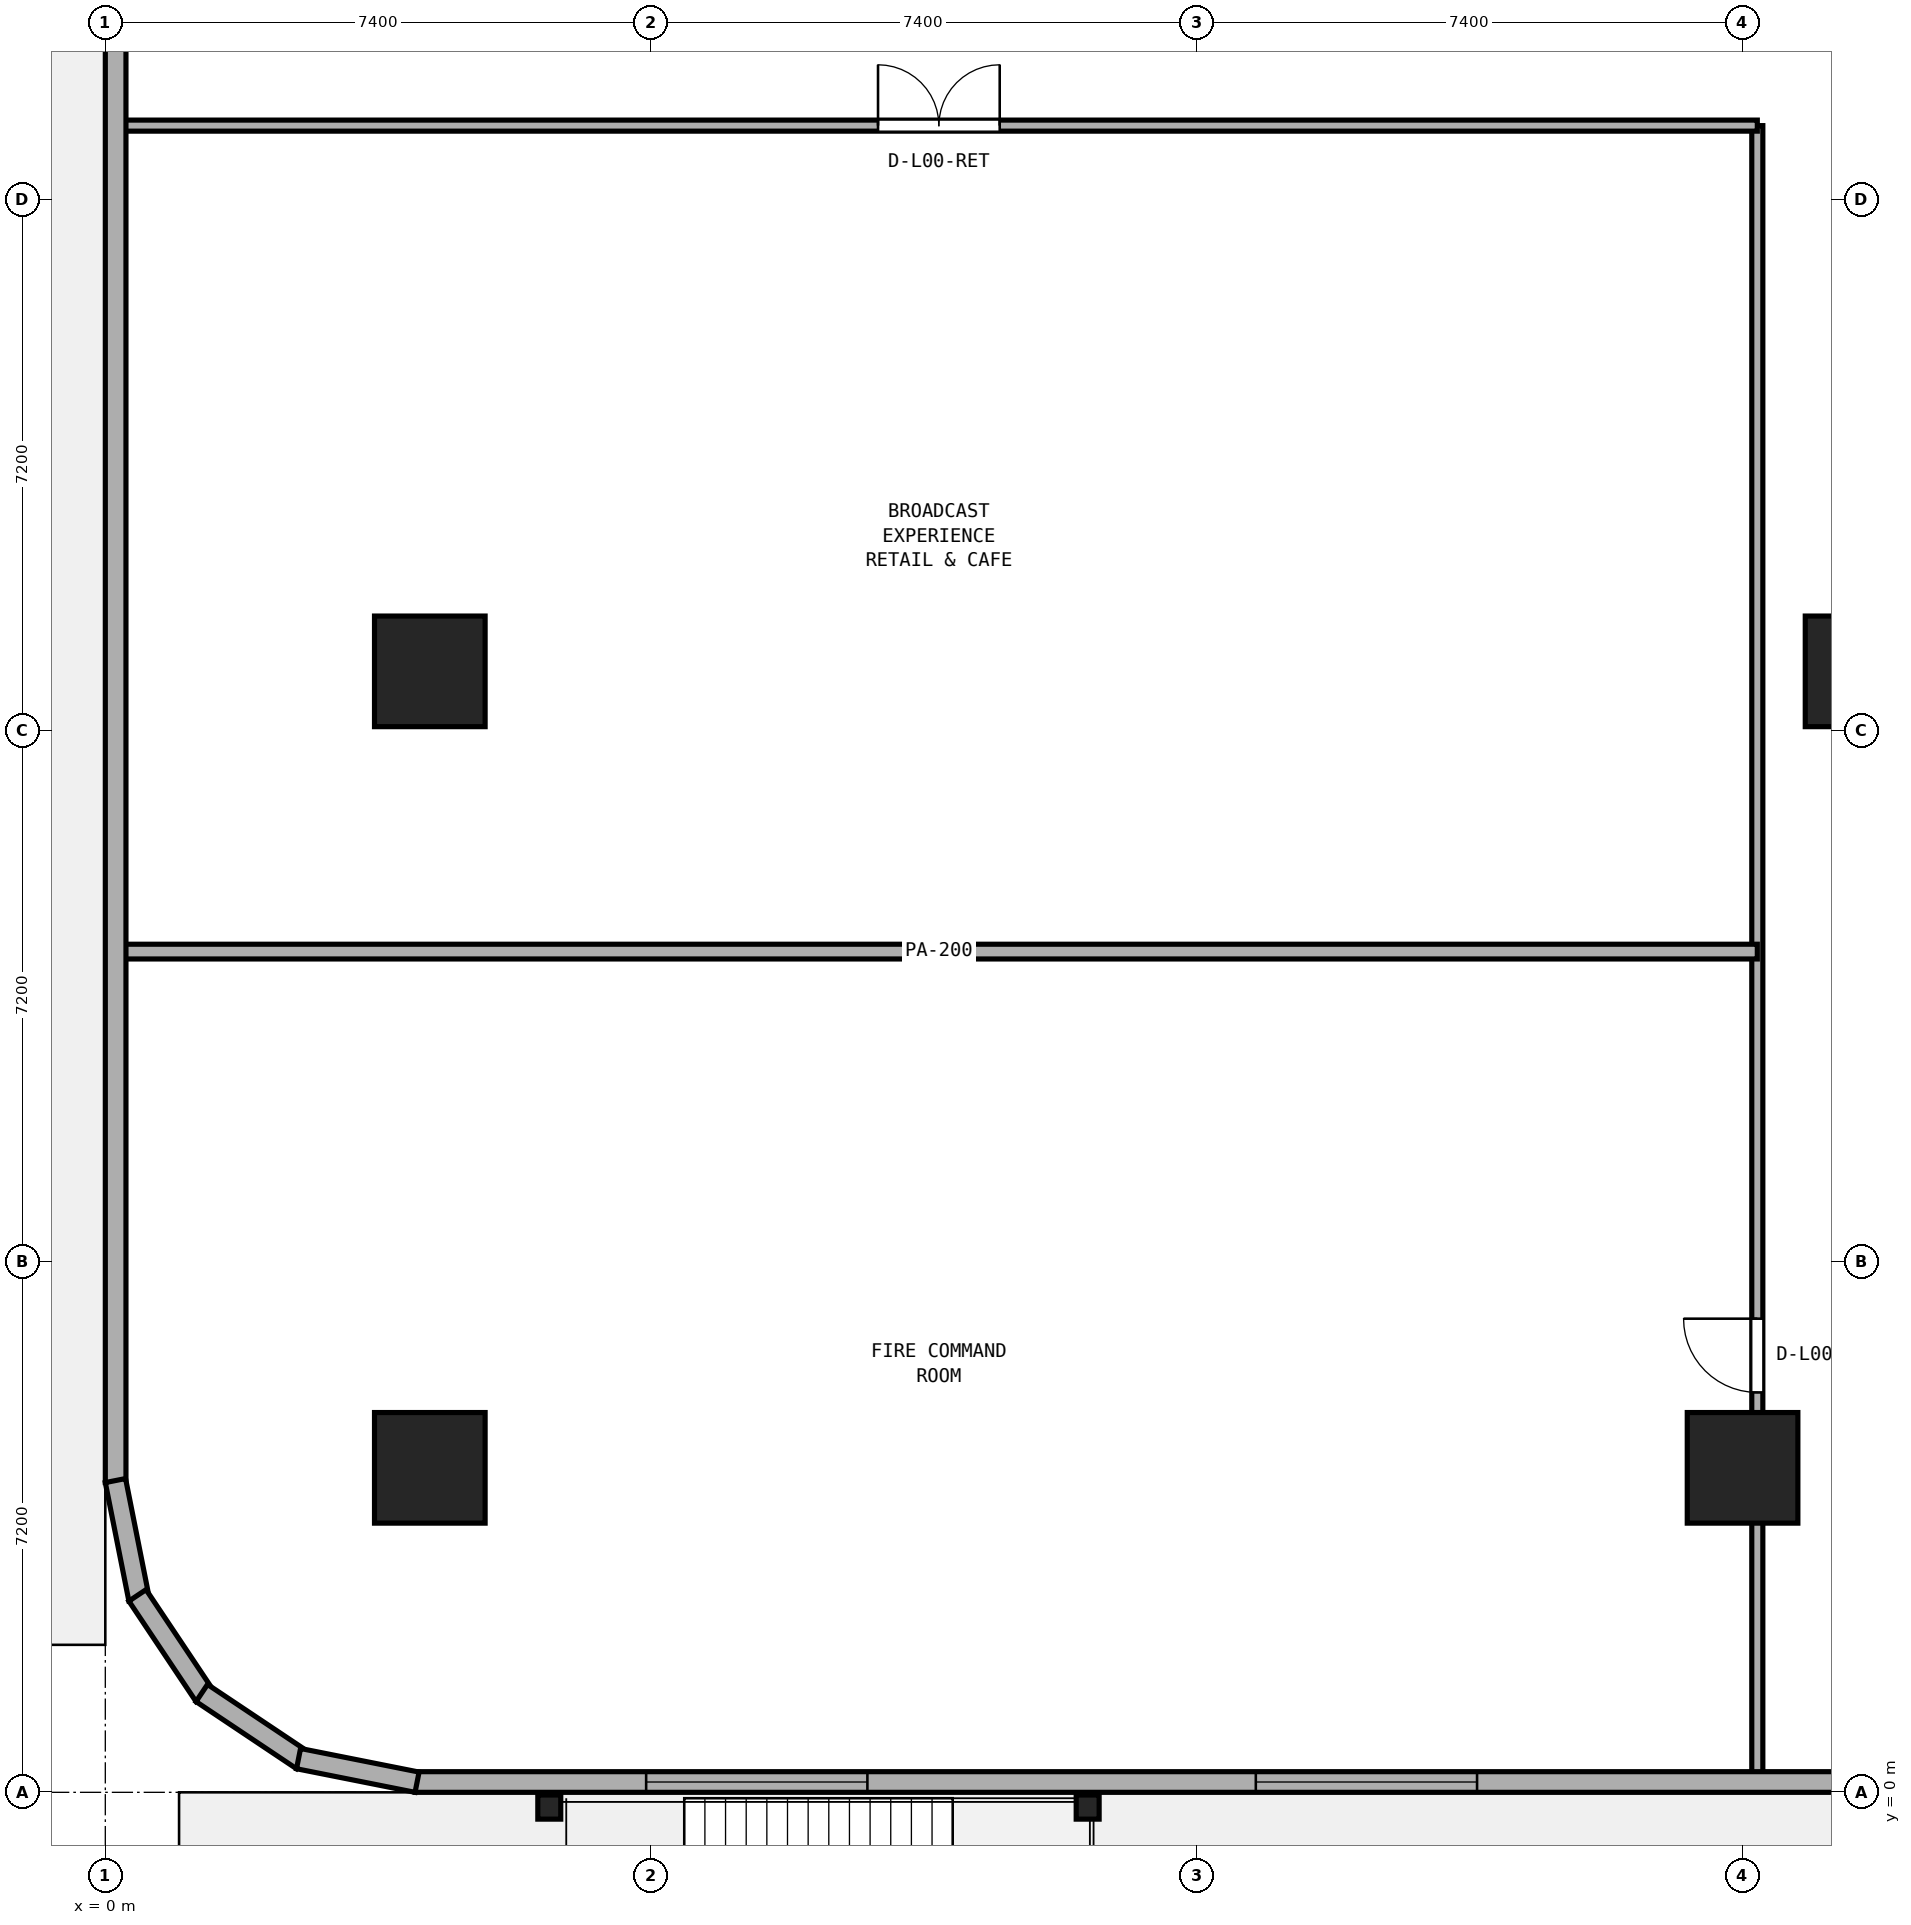
"""IFC4 building model, lengths in metres.
Left out: names, types, materials, properties, quantities, classifications, styles, units other than length and angle.
Written with IfcOpenShell. Run it as: python <this file> out.ifc"""

import sys

from ifc_helpers import new_model, si_unit, direction, frame, frame_2d, origin, origin_2d, place, context, subcontext, project, spatial, rectangle, i_section, extrude, element, fill, save


model = new_model("IFC4")
c1 = context("Model", 3, precision=1e-05, world=origin(), true_north=direction((0.0, 1.0)))
c2 = subcontext(c1, "Body", "Model", "MODEL_VIEW")
j1 = project(units=[si_unit("LENGTHUNIT", "METRE"), si_unit("PLANEANGLEUNIT", "RADIAN")], contexts=[c1])
p1 = place(None, origin())
s1 = spatial("IfcSite", under=j1, at=p1, CompositionType="ELEMENT")
p2 = place(p1, origin())
s2 = spatial("IfcBuilding", under=s1, at=p2, CompositionType="ELEMENT")
p3 = place(p2, origin())
s3 = spatial("IfcBuildingStorey", under=s2, at=p3, CompositionType="ELEMENT", Elevation=0.0)
for number, where, z_axis, x_axis in (
    (1, (4.4, 4.4, 0.0), (0.0, 0.0, 1.0), (1.0, 0.0, 0.0)),
    (2, (22.2, 4.4, 0.0), (0.0, 0.0, 1.0), (1.0, 0.0, 0.0)),
    (3, (4.4, 15.2, 0.0), (0.0, 0.0, 1.0), (1.0, 0.0, 0.0)),
    (4, (23.8, 15.2, 0.0), (0.0, 0.0, 1.0), (1.0, 0.0, 0.0)),
):
    element("IfcColumn", number, at=place(p3, frame(where, z_axis=z_axis, x_axis=x_axis)), inside=s3, PredefinedType="COLUMN", context=c2, shape_type="SweptSolid", body=[
        extrude(rectangle(XDim=1.5, YDim=1.5, at=origin_2d()), origin(), (0.0, 0.0, 1.0), 5.0),
    ])
for number, where, z_axis, x_axis in (
    (5, (6.02, -0.2, -0.25), (0.0, 0.0, 1.0), (1.0, 0.0, 0.0)),
    (6, (13.32, -0.2, -0.25), (0.0, 0.0, 1.0), (1.0, 0.0, 0.0)),
):
    element("IfcColumn", number, at=place(p3, frame(where, z_axis=z_axis, x_axis=x_axis)), inside=s3, PredefinedType="COLUMN", context=c2, shape_type="SweptSolid", body=[
        extrude(i_section(OverallWidth=0.311, OverallDepth=0.327, WebThickness=0.016, FlangeThickness=0.025, at=origin_2d()), origin(), (0.0, 0.0, 1.0), 5.25),
    ])
p4 = place(p3, frame((22.4, 0.205, 0.0), z_axis=(0.0, 0.0, 1.0), x_axis=(0.0, 1.0, 0.0)))
e7 = element("IfcWall", 7, at=p4, inside=s3, PredefinedType="PARTITIONING", context=c2, shape_type="SweptSolid", body=[
    extrude(rectangle(XDim=22.395, YDim=0.15, at=frame_2d((11.198, 0.0))), origin(), (0.0, 0.0, 1.0), 3.89),
])
p5 = place(p4, frame((5.218, 0.0, 0.0)))
e8 = element("IfcOpeningElement", 8, at=p5, cuts=e7, PredefinedType="OPENING", context=c2, shape_type="SweptSolid", body=[
    extrude(rectangle(XDim=1.0, YDim=2.12, at=frame_2d((0.5, 1.06))), frame((0.0, 0.085, 0.0), z_axis=(0.0, -1.0, 0.0), x_axis=(1.0, 0.0, 0.0)), (0.0, 0.0, 1.0), 0.17),
])
p6 = place(p3, frame((0.205, 11.4, 0.0), z_axis=(0.0, 0.0, 1.0), x_axis=(1.0, 0.0, 0.0)))
e9 = element("IfcWall", 9, at=p6, inside=s3, PredefinedType="PARTITIONING", context=c2, shape_type="SweptSolid", body=[
    extrude(rectangle(XDim=22.195, YDim=0.2, at=frame_2d((11.097, 0.0))), origin(), (0.0, 0.0, 1.0), 4.66),
])
p7 = place(p3, frame((0.205, 22.6, 0.0), z_axis=(0.0, 0.0, 1.0), x_axis=(1.0, 0.0, 0.0)))
e10 = element("IfcWall", 10, at=p7, inside=s3, PredefinedType="PARTITIONING", context=c2, shape_type="SweptSolid", body=[
    extrude(rectangle(XDim=22.195, YDim=0.15, at=frame_2d((11.097, 0.0))), origin(), (0.0, 0.0, 1.0), 4.66),
])
p8 = place(p7, frame((10.272, 0.0, 0.0)))
e11 = element("IfcOpeningElement", 11, at=p8, cuts=e10, PredefinedType="OPENING", context=c2, shape_type="SweptSolid", body=[
    extrude(rectangle(XDim=1.65, YDim=2.15, at=frame_2d((0.825, 1.075))), frame((0.0, 0.085, 0.0), z_axis=(0.0, -1.0, 0.0), x_axis=(1.0, 0.0, 0.0)), (0.0, 0.0, 1.0), 0.17),
])
p9 = place(p3, frame((0.14, 4.2, 0.0), z_axis=(0.0, 0.0, 1.0), x_axis=(0.0, 1.0, 0.0)))
e12 = element("IfcWall", 12, at=p9, inside=s3, PredefinedType="STANDARD", context=c2, shape_type="SweptSolid", body=[
    extrude(rectangle(XDim=42.0, YDim=0.28, at=frame_2d((21.0, 0.0))), origin(), (0.0, 0.0, 1.0), 3.76),
])
p10 = place(p9, frame((20.0, 0.0, 0.0)))
e13 = element("IfcOpeningElement", 13, at=p10, cuts=e12, PredefinedType="OPENING", context=c2, shape_type="SweptSolid", body=[
    extrude(rectangle(XDim=2.0, YDim=2.6, at=frame_2d((1.0, 1.3))), frame((0.0, 0.15, 0.0), z_axis=(0.0, -1.0, 0.0), x_axis=(1.0, 0.0, 0.0)), (0.0, 0.0, 1.0), 0.3),
])
p11 = place(p9, frame((37.05, 0.0, 0.0)))
e14 = element("IfcOpeningElement", 14, at=p11, cuts=e12, PredefinedType="OPENING", context=c2, shape_type="SweptSolid", body=[
    extrude(rectangle(XDim=1.1, YDim=2.15, at=frame_2d((0.55, 1.075))), frame((0.0, 0.15, 0.0), z_axis=(0.0, -1.0, 0.0), x_axis=(1.0, 0.0, 0.0)), (0.0, 0.0, 1.0), 0.3),
])
p12 = place(p3, frame((4.2, 0.14, 0.0), z_axis=(0.0, 0.0, 1.0), x_axis=(1.0, 0.0, 0.0)))
e15 = element("IfcWall", 15, at=p12, inside=s3, PredefinedType="STANDARD", context=c2, shape_type="SweptSolid", body=[
    extrude(rectangle(XDim=25.8, YDim=0.28, at=frame_2d((12.9, 0.0))), origin(), (0.0, 0.0, 1.0), 4.66),
])
p13 = place(p12, frame((3.133, 0.0, 0.9)))
e16 = element("IfcOpeningElement", 16, at=p13, cuts=e15, PredefinedType="OPENING", context=c2, shape_type="SweptSolid", body=[
    extrude(rectangle(XDim=3.0, YDim=2.2, at=frame_2d((1.5, 1.1))), frame((0.0, 0.15, 0.0), z_axis=(0.0, -1.0, 0.0), x_axis=(1.0, 0.0, 0.0)), (0.0, 0.0, 1.0), 0.3),
])
p14 = place(p12, frame((11.4, 0.0, 0.9)))
e17 = element("IfcOpeningElement", 17, at=p14, cuts=e15, PredefinedType="OPENING", context=c2, shape_type="SweptSolid", body=[
    extrude(rectangle(XDim=3.0, YDim=2.2, at=frame_2d((1.5, 1.1))), frame((0.0, 0.15, 0.0), z_axis=(0.0, -1.0, 0.0), x_axis=(1.0, 0.0, 0.0)), (0.0, 0.0, 1.0), 0.3),
])
p15 = place(p12, frame((19.667, 0.0, 0.9)))
e18 = element("IfcOpeningElement", 18, at=p15, cuts=e15, PredefinedType="OPENING", context=c2, shape_type="SweptSolid", body=[
    extrude(rectangle(XDim=3.0, YDim=2.2, at=frame_2d((1.5, 1.1))), frame((0.0, 0.15, 0.0), z_axis=(0.0, -1.0, 0.0), x_axis=(1.0, 0.0, 0.0)), (0.0, 0.0, 1.0), 0.3),
])
for number, where, z_axis, x_axis in (
    (19, (0.137, 4.227, 0.0), (0.0, 0.0, 1.0), (0.195, -0.981, 0.0)),
    (20, (0.436, 2.67, 0.0), (0.0, 0.0, 1.0), (0.556, -0.831, 0.0)),
    (21, (1.308, 1.347, 0.0), (0.0, 0.0, 1.0), (0.831, -0.556, 0.0)),
    (22, (2.62, 0.457, 0.0), (0.0, 0.0, 1.0), (0.981, -0.195, 0.0)),
):
    element("IfcWall", number, at=place(p3, frame(where, z_axis=z_axis, x_axis=x_axis)), inside=s3, PredefinedType="STANDARD", context=c2, shape_type="SweptSolid", body=[
        extrude(rectangle(XDim=1.639, YDim=0.28, at=frame_2d((0.819, 0.0))), origin(), (0.0, 0.0, 1.0), 4.66),
    ])
p16 = place(p5, origin())
e23 = element("IfcDoor", 23, at=p16, inside=s3, OperationType="SINGLE_SWING_RIGHT", PredefinedType="DOOR", context=c2, shape_type="SweptSolid", body=[
    extrude(rectangle(XDim=1.0, YDim=2.12, at=frame_2d((0.5, 1.06))), frame((0.0, 0.025, 0.0), z_axis=(0.0, -1.0, 0.0), x_axis=(1.0, 0.0, 0.0)), (0.0, 0.0, 1.0), 0.05),
])
fill(e8, e23)
p17 = place(p8, origin())
e24 = element("IfcDoor", 24, at=p17, inside=s3, OperationType="DOUBLE_DOOR_SINGLE_SWING", PredefinedType="DOOR", context=c2, shape_type="SweptSolid", body=[
    extrude(rectangle(XDim=1.65, YDim=2.15, at=frame_2d((0.825, 1.075))), frame((0.0, 0.025, 0.0), z_axis=(0.0, -1.0, 0.0), x_axis=(1.0, 0.0, 0.0)), (0.0, 0.0, 1.0), 0.05),
])
fill(e11, e24)
p18 = place(p13, origin())
e25 = element("IfcWindow", 25, at=p18, inside=s3, PartitioningType="SINGLE_PANEL", PredefinedType="WINDOW", context=c2, shape_type="SweptSolid", body=[
    extrude(rectangle(XDim=3.0, YDim=2.2, at=frame_2d((1.5, 1.1))), frame((0.0, 0.03, 0.0), z_axis=(0.0, -1.0, 0.0), x_axis=(1.0, 0.0, 0.0)), (0.0, 0.0, 1.0), 0.06),
])
fill(e16, e25)
p19 = place(p14, origin())
e26 = element("IfcWindow", 26, at=p19, inside=s3, PartitioningType="SINGLE_PANEL", PredefinedType="WINDOW", context=c2, shape_type="SweptSolid", body=[
    extrude(rectangle(XDim=3.0, YDim=2.2, at=frame_2d((1.5, 1.1))), frame((0.0, 0.03, 0.0), z_axis=(0.0, -1.0, 0.0), x_axis=(1.0, 0.0, 0.0)), (0.0, 0.0, 1.0), 0.06),
])
fill(e17, e26)
save(model, sys.argv[1])
